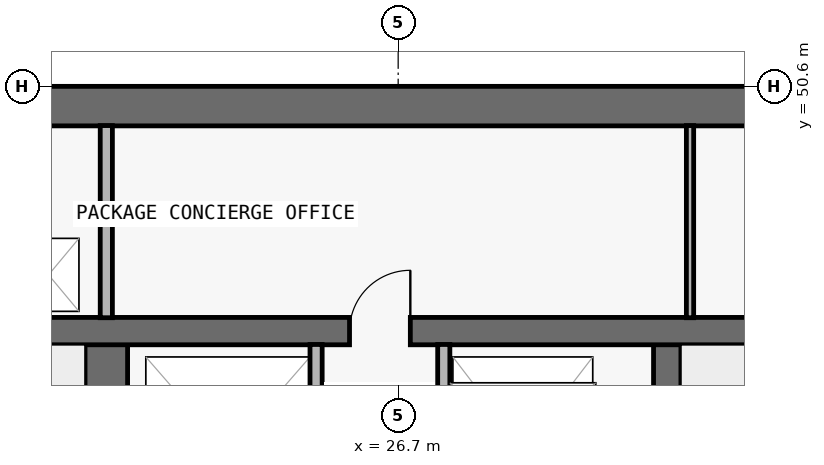
"""IFC4 building model, lengths in metres.
Left out: names, types, materials, properties, quantities, classifications, styles, units other than length and angle.
Written with IfcOpenShell. Run it as: python <this file> out.ifc"""

import sys

from ifc_helpers import new_model, si_unit, direction, frame, frame_2d, origin, place, context, subcontext, project, spatial, rectangle, extrude, element, fill, save


model = new_model("IFC4")
c1 = context("Model", 3, precision=1e-05, world=origin(), true_north=direction((0.0, 1.0)))
c2 = subcontext(c1, "Body", "Model", "MODEL_VIEW")
j1 = project(units=[si_unit("LENGTHUNIT", "METRE"), si_unit("PLANEANGLEUNIT", "RADIAN")], contexts=[c1])
p1 = place(None, origin())
s1 = spatial("IfcSite", under=j1, at=p1, CompositionType="ELEMENT")
p2 = place(p1, origin())
s2 = spatial("IfcBuilding", under=s1, at=p2, CompositionType="ELEMENT")
p3 = place(p2, frame((0.0, 0.0, 266.1)))
s3 = spatial("IfcBuildingStorey", under=s2, at=p3, CompositionType="ELEMENT", Elevation=266.1)
p4 = place(p3, frame((17.95, 50.275, 0.0), z_axis=(0.0, 0.0, 1.0), x_axis=(1.0, 0.0, 0.0)))
e1 = element("IfcWall", 1, at=p4, inside=s3, PredefinedType="SHEAR", context=c2, shape_type="SweptSolid", body=[
    extrude(rectangle(XDim=41.9, YDim=0.65, at=frame_2d((20.95, 0.0))), origin(), (0.0, 0.0, 1.0), 3.0),
])
p5 = place(p3, frame((21.9, 37.0, 0.0), z_axis=(0.0, 0.0, 1.0), x_axis=(0.0, 1.0, 0.0)))
e2 = element("IfcWall", 2, at=p5, inside=s3, PredefinedType="SHEAR", context=c2, shape_type="SweptSolid", body=[
    extrude(rectangle(XDim=9.575, YDim=0.7, at=frame_2d((4.788, 0.0))), origin(), (0.0, 0.0, 1.0), 3.0),
])
p6 = place(p5, frame((0.55, 0.0, 0.0)))
e3 = element("IfcOpeningElement", 3, at=p6, cuts=e2, PredefinedType="OPENING", context=c2, shape_type="SweptSolid", body=[
    extrude(rectangle(XDim=1.1, YDim=2.15, at=frame_2d((0.55, 1.075))), frame((0.0, 0.36, 0.0), z_axis=(0.0, -1.0, 0.0), x_axis=(1.0, 0.0, 0.0)), (0.0, 0.0, 1.0), 0.72),
])
p7 = place(p3, frame((31.125, 37.0, 0.0), z_axis=(0.0, 0.0, 1.0), x_axis=(0.0, 1.0, 0.0)))
e4 = element("IfcWall", 4, at=p7, inside=s3, PredefinedType="SHEAR", context=c2, shape_type="SweptSolid", body=[
    extrude(rectangle(XDim=9.575, YDim=0.45, at=frame_2d((4.788, 0.0))), origin(), (0.0, 0.0, 1.0), 3.0),
])
p8 = place(p3, frame((18.3, 46.575, 0.0), z_axis=(0.0, 0.0, 1.0), x_axis=(1.0, 0.0, 0.0)))
e5 = element("IfcWall", 5, at=p8, inside=s3, PredefinedType="SHEAR", context=c2, shape_type="SweptSolid", body=[
    extrude(rectangle(XDim=41.2, YDim=0.45, at=frame_2d((20.6, 0.0))), origin(), (0.0, 0.0, 1.0), 3.0),
])
p9 = place(p8, frame((7.6, 0.0, 0.0)))
e6 = element("IfcOpeningElement", 6, at=p9, cuts=e5, PredefinedType="OPENING", context=c2, shape_type="SweptSolid", body=[
    extrude(rectangle(XDim=1.0, YDim=2.2, at=frame_2d((0.5, 1.1))), frame((0.0, 0.235, 0.0), z_axis=(0.0, -1.0, 0.0), x_axis=(1.0, 0.0, 0.0)), (0.0, 0.0, 1.0), 0.47),
])
p10 = place(p8, frame((32.625, 0.0, 0.0)))
e7 = element("IfcOpeningElement", 7, at=p10, cuts=e5, PredefinedType="OPENING", context=c2, shape_type="SweptSolid", body=[
    extrude(rectangle(XDim=1.05, YDim=2.15, at=frame_2d((0.525, 1.075))), frame((0.0, 0.235, 0.0), z_axis=(0.0, -1.0, 0.0), x_axis=(1.0, 0.0, 0.0)), (0.0, 0.0, 1.0), 0.47),
])
p11 = place(p3, frame((21.9, 46.795, 0.0), z_axis=(0.0, 0.0, 1.0), x_axis=(0.0, 1.0, 0.0)))
e8 = element("IfcWall", 8, at=p11, inside=s3, PredefinedType="PARTITIONING", context=c2, shape_type="SweptSolid", body=[
    extrude(rectangle(XDim=3.16, YDim=0.2, at=frame_2d((1.58, 0.0))), origin(), (0.0, 0.0, 1.0), 3.0),
])
for number, where, z_axis, x_axis in (
    (9, (25.35, 43.17, 0.0), (0.0, 0.0, 1.0), (0.0, 1.0, 0.0)),
    (10, (27.45, 43.17, 0.0), (0.0, 0.0, 1.0), (0.0, 1.0, 0.0)),
):
    element("IfcWall", number, at=place(p3, frame(where, z_axis=z_axis, x_axis=x_axis)), inside=s3, PredefinedType="PARTITIONING", context=c2, shape_type="SweptSolid", body=[
        extrude(rectangle(XDim=3.185, YDim=0.2, at=frame_2d((1.593, 0.0))), origin(), (0.0, 0.0, 1.0), 3.0),
    ])
p12 = place(p3, frame((31.5, 46.795, 0.0), z_axis=(0.0, 0.0, 1.0), x_axis=(0.0, 1.0, 0.0)))
e11 = element("IfcWall", 11, at=p12, inside=s3, PredefinedType="PARTITIONING", context=c2, shape_type="SweptSolid", body=[
    extrude(rectangle(XDim=3.16, YDim=0.12, at=frame_2d((1.58, 0.0))), origin(), (0.0, 0.0, 1.0), 3.0),
])
p13 = place(p9, origin())
e12 = element("IfcDoor", 12, at=p13, inside=s3, OperationType="SINGLE_SWING_RIGHT", PredefinedType="DOOR", context=c2, shape_type="SweptSolid", body=[
    extrude(rectangle(XDim=1.0, YDim=2.2, at=frame_2d((0.5, 1.1))), frame((0.0, 0.025, 0.0), z_axis=(0.0, -1.0, 0.0), x_axis=(1.0, 0.0, 0.0)), (0.0, 0.0, 1.0), 0.05),
])
fill(e6, e12)
save(model, sys.argv[1])
